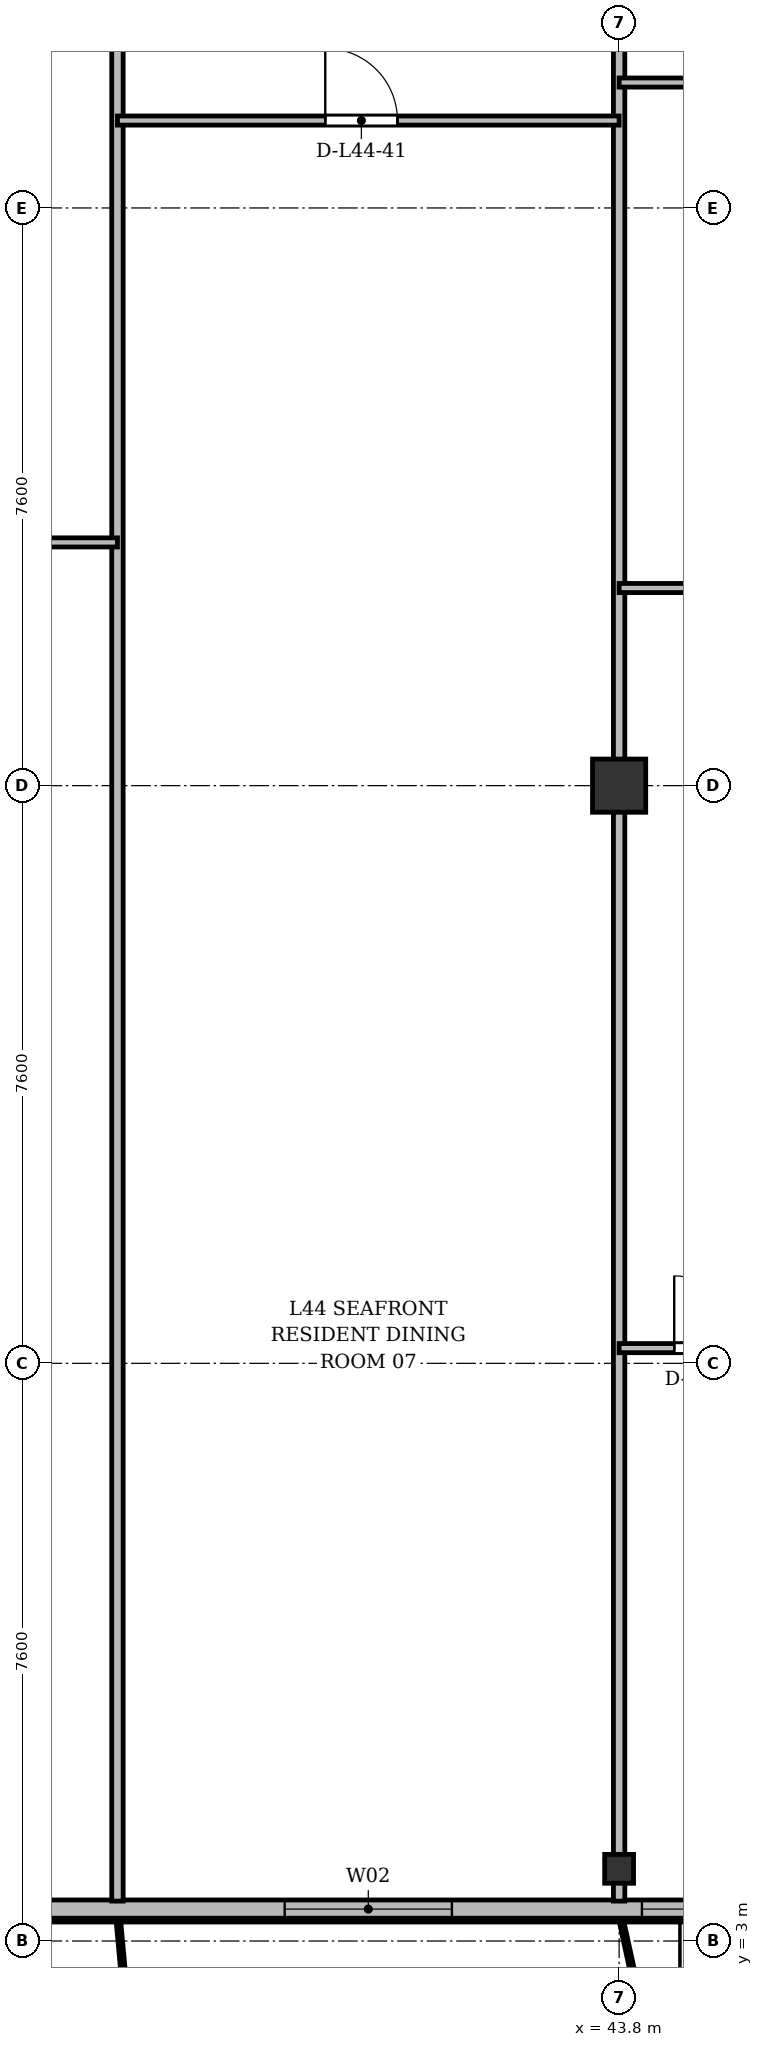
"""IFC4 building model, lengths in metres.
Left out: names, types, materials, properties, quantities, classifications, styles, units other than length and angle.
Written with IfcOpenShell. Run it as: python <this file> out.ifc"""

import sys

from ifc_helpers import new_model, si_unit, direction, frame, frame_2d, origin, origin_2d, place, context, subcontext, project, spatial, rectangle, i_section, extrude, source, transform, mapped, element, fill, save


model = new_model("IFC4")
c1 = context("Model", 3, precision=1e-05, world=origin(), true_north=direction((0.0, 1.0)))
c2 = subcontext(c1, "Body", "Model", "MODEL_VIEW")
j1 = project(units=[si_unit("LENGTHUNIT", "METRE"), si_unit("PLANEANGLEUNIT", "RADIAN")], contexts=[c1])
p1 = place(None, origin())
s1 = spatial("IfcSite", under=j1, at=p1, CompositionType="ELEMENT")
p2 = place(p1, origin())
s2 = spatial("IfcBuilding", under=s1, at=p2, CompositionType="ELEMENT")
p3 = place(p2, frame((0.0, 0.0, 168.1)))
s3 = spatial("IfcBuildingStorey", under=s2, at=p3, CompositionType="ELEMENT", Elevation=168.1)
m1 = source(origin(), c2, "Body", "SweptSolid", [
    extrude(i_section(OverallWidth=0.38, OverallDepth=0.38, WebThickness=0.02, FlangeThickness=0.03, at=origin_2d()), origin(), (0.0, 0.0, 1.0), 3.6),
])
p4 = place(p3, frame((43.8, 3.95, 0.0), z_axis=(0.0, 0.0, 1.0), x_axis=(1.0, 0.0, 0.0)))
e1 = element("IfcColumn", 1, at=p4, inside=s3, PredefinedType="COLUMN", context=c2, shape_type="MappedRepresentation", body=[
    mapped(m1, transform((0.0, 0.0, 0.0), x_axis=(1.0, 0.0, 0.0), y_axis=(0.0, 1.0, 0.0), z_axis=(0.0, 0.0, 1.0), scale=1.0)),
])
m2 = source(origin(), c2, "Body", "SweptSolid", [
    extrude(rectangle(XDim=0.7, YDim=0.7, at=origin_2d()), origin(), (0.0, 0.0, 1.0), 3.6),
])
p5 = place(p3, frame((43.8, 18.2, 0.0), z_axis=(0.0, 0.0, 1.0), x_axis=(1.0, 0.0, 0.0)))
e2 = element("IfcColumn", 2, at=p5, inside=s3, PredefinedType="COLUMN", context=c2, shape_type="MappedRepresentation", body=[
    mapped(m2, transform((0.0, 0.0, 0.0), x_axis=(1.0, 0.0, 0.0), y_axis=(0.0, 1.0, 0.0), z_axis=(0.0, 0.0, 1.0), scale=1.0)),
])
p6 = place(p3, frame((63.6, 3.42, 0.0), z_axis=(0.0, 0.0, 1.0), x_axis=(-1.0, 0.0, 0.0)))
e3 = element("IfcWall", 3, at=p6, inside=s3, PredefinedType="SOLIDWALL", context=c2, shape_type="SweptSolid", body=[
    extrude(rectangle(XDim=52.8, YDim=0.24, at=frame_2d((26.4, 0.0))), origin(), (0.0, 0.0, 1.0), 3.35),
])
p7 = place(p6, frame((1.62, 0.0, 0.9)))
e4 = element("IfcOpeningElement", 4, at=p7, cuts=e3, PredefinedType="OPENING", context=c2, shape_type="SweptSolid", body=[
    extrude(rectangle(XDim=1.65, YDim=1.85, at=frame_2d((0.825, 0.925))), frame((0.0, 0.13, 0.0), z_axis=(0.0, -1.0, 0.0), x_axis=(1.0, 0.0, 0.0)), (0.0, 0.0, 1.0), 0.26),
])
p8 = place(p6, frame((5.2, 0.0, 0.9)))
e5 = element("IfcOpeningElement", 5, at=p8, cuts=e3, PredefinedType="OPENING", context=c2, shape_type="SweptSolid", body=[
    extrude(rectangle(XDim=1.8, YDim=1.8, at=frame_2d((0.9, 0.9))), frame((0.0, 0.13, 0.0), z_axis=(0.0, -1.0, 0.0), x_axis=(1.0, 0.0, 0.0)), (0.0, 0.0, 1.0), 0.26),
])
p9 = place(p6, frame((7.65, 0.0, 0.9)))
e6 = element("IfcOpeningElement", 6, at=p9, cuts=e3, PredefinedType="OPENING", context=c2, shape_type="SweptSolid", body=[
    extrude(rectangle(XDim=1.5, YDim=1.75, at=frame_2d((0.75, 0.875))), frame((0.0, 0.13, 0.0), z_axis=(0.0, -1.0, 0.0), x_axis=(1.0, 0.0, 0.0)), (0.0, 0.0, 1.0), 0.26),
])
p10 = place(p6, frame((10.25, 0.0, 0.9)))
e7 = element("IfcOpeningElement", 7, at=p10, cuts=e3, PredefinedType="OPENING", context=c2, shape_type="SweptSolid", body=[
    extrude(rectangle(XDim=1.5, YDim=1.75, at=frame_2d((0.75, 0.875))), frame((0.0, 0.13, 0.0), z_axis=(0.0, -1.0, 0.0), x_axis=(1.0, 0.0, 0.0)), (0.0, 0.0, 1.0), 0.26),
])
p11 = place(p6, frame((13.62, 0.0, 0.0)))
e8 = element("IfcOpeningElement", 8, at=p11, cuts=e3, PredefinedType="OPENING", context=c2, shape_type="SweptSolid", body=[
    extrude(rectangle(XDim=1.2, YDim=2.2, at=frame_2d((0.6, 1.1))), frame((0.0, 0.13, 0.0), z_axis=(0.0, -1.0, 0.0), x_axis=(1.0, 0.0, 0.0)), (0.0, 0.0, 1.0), 0.26),
])
p12 = place(p6, frame((15.375, 0.0, 0.9)))
e9 = element("IfcOpeningElement", 9, at=p12, cuts=e3, PredefinedType="OPENING", context=c2, shape_type="SweptSolid", body=[
    extrude(rectangle(XDim=1.65, YDim=1.85, at=frame_2d((0.825, 0.925))), frame((0.0, 0.13, 0.0), z_axis=(0.0, -1.0, 0.0), x_axis=(1.0, 0.0, 0.0)), (0.0, 0.0, 1.0), 0.26),
])
p13 = place(p6, frame((17.7, 0.0, 0.9)))
e10 = element("IfcOpeningElement", 10, at=p13, cuts=e3, PredefinedType="OPENING", context=c2, shape_type="SweptSolid", body=[
    extrude(rectangle(XDim=1.8, YDim=1.8, at=frame_2d((0.9, 0.9))), frame((0.0, 0.13, 0.0), z_axis=(0.0, -1.0, 0.0), x_axis=(1.0, 0.0, 0.0)), (0.0, 0.0, 1.0), 0.26),
])
p14 = place(p6, frame((22.0, 0.0, 0.9)))
e11 = element("IfcOpeningElement", 11, at=p14, cuts=e3, PredefinedType="OPENING", context=c2, shape_type="SweptSolid", body=[
    extrude(rectangle(XDim=2.2, YDim=1.8, at=frame_2d((1.1, 0.9))), frame((0.0, 0.13, 0.0), z_axis=(0.0, -1.0, 0.0), x_axis=(1.0, 0.0, 0.0)), (0.0, 0.0, 1.0), 0.26),
])
p15 = place(p6, frame((28.95, 0.0, 0.9)))
e12 = element("IfcOpeningElement", 12, at=p15, cuts=e3, PredefinedType="OPENING", context=c2, shape_type="SweptSolid", body=[
    extrude(rectangle(XDim=1.5, YDim=1.75, at=frame_2d((0.75, 0.875))), frame((0.0, 0.13, 0.0), z_axis=(0.0, -1.0, 0.0), x_axis=(1.0, 0.0, 0.0)), (0.0, 0.0, 1.0), 0.26),
])
p16 = place(p6, frame((35.6, 0.0, 0.9)))
e13 = element("IfcOpeningElement", 13, at=p16, cuts=e3, PredefinedType="OPENING", context=c2, shape_type="SweptSolid", body=[
    extrude(rectangle(XDim=2.0, YDim=1.95, at=frame_2d((1.0, 0.975))), frame((0.0, 0.13, 0.0), z_axis=(0.0, -1.0, 0.0), x_axis=(1.0, 0.0, 0.0)), (0.0, 0.0, 1.0), 0.26),
])
p17 = place(p6, frame((41.656, 0.0, 0.0)))
e14 = element("IfcOpeningElement", 14, at=p17, cuts=e3, PredefinedType="OPENING", context=c2, shape_type="SweptSolid", body=[
    extrude(rectangle(XDim=1.2, YDim=2.2, at=frame_2d((0.6, 1.1))), frame((0.0, 0.13, 0.0), z_axis=(0.0, -1.0, 0.0), x_axis=(1.0, 0.0, 0.0)), (0.0, 0.0, 1.0), 0.26),
])
p18 = place(p6, frame((43.65, 0.0, 0.9)))
e15 = element("IfcOpeningElement", 15, at=p18, cuts=e3, PredefinedType="OPENING", context=c2, shape_type="SweptSolid", body=[
    extrude(rectangle(XDim=1.5, YDim=1.75, at=frame_2d((0.75, 0.875))), frame((0.0, 0.13, 0.0), z_axis=(0.0, -1.0, 0.0), x_axis=(1.0, 0.0, 0.0)), (0.0, 0.0, 1.0), 0.26),
])
p19 = place(p6, frame((45.95, 0.0, 0.9)))
e16 = element("IfcOpeningElement", 16, at=p19, cuts=e3, PredefinedType="OPENING", context=c2, shape_type="SweptSolid", body=[
    extrude(rectangle(XDim=1.5, YDim=1.75, at=frame_2d((0.75, 0.875))), frame((0.0, 0.13, 0.0), z_axis=(0.0, -1.0, 0.0), x_axis=(1.0, 0.0, 0.0)), (0.0, 0.0, 1.0), 0.26),
])
p20 = place(p6, frame((49.605, 0.0, 0.9)))
e17 = element("IfcOpeningElement", 17, at=p20, cuts=e3, PredefinedType="OPENING", context=c2, shape_type="SweptSolid", body=[
    extrude(rectangle(XDim=1.5, YDim=1.75, at=frame_2d((0.75, 0.875))), frame((0.0, 0.13, 0.0), z_axis=(0.0, -1.0, 0.0), x_axis=(1.0, 0.0, 0.0)), (0.0, 0.0, 1.0), 0.26),
])
p21 = place(p3, frame((37.2, 3.525, 0.0), z_axis=(0.0, 0.0, 1.0), x_axis=(0.0, 1.0, 0.0)))
e18 = element("IfcWall", 18, at=p21, inside=s3, PredefinedType="PARTITIONING", context=c2, shape_type="SweptSolid", body=[
    extrude(rectangle(XDim=27.275, YDim=0.15, at=frame_2d((13.638, 0.0))), origin(), (0.0, 0.0, 1.0), 2.75),
])
p22 = place(p3, frame((43.8, 3.525, 0.0), z_axis=(0.0, 0.0, 1.0), x_axis=(0.0, 1.0, 0.0)))
e19 = element("IfcWall", 19, at=p22, inside=s3, PredefinedType="PARTITIONING", context=c2, shape_type="SweptSolid", body=[
    extrude(rectangle(XDim=27.275, YDim=0.15, at=frame_2d((13.638, 0.0))), origin(), (0.0, 0.0, 1.0), 2.85),
])
p23 = place(p3, frame((30.6, 21.4, 0.0), z_axis=(0.0, 0.0, 1.0), x_axis=(1.0, 0.0, 0.0)))
e20 = element("IfcWall", 20, at=p23, inside=s3, PredefinedType="PARTITIONING", context=c2, shape_type="SweptSolid", body=[
    extrude(rectangle(XDim=6.6, YDim=0.12, at=frame_2d((3.3, 0.0))), origin(), (0.0, 0.0, 1.0), 2.85),
])
p24 = place(p23, frame((2.734, 0.0, 0.0)))
e21 = element("IfcOpeningElement", 21, at=p24, cuts=e20, PredefinedType="OPENING", context=c2, shape_type="SweptSolid", body=[
    extrude(rectangle(XDim=0.95, YDim=2.15, at=frame_2d((0.475, 1.075))), frame((0.0, 0.07, 0.0), z_axis=(0.0, -1.0, 0.0), x_axis=(1.0, 0.0, 0.0)), (0.0, 0.0, 1.0), 0.14),
])
p25 = place(p3, frame((37.2, 26.95, 0.0), z_axis=(0.0, 0.0, 1.0), x_axis=(1.0, 0.0, 0.0)))
e22 = element("IfcWall", 22, at=p25, inside=s3, PredefinedType="PARTITIONING", context=c2, shape_type="SweptSolid", body=[
    extrude(rectangle(XDim=6.6, YDim=0.12, at=frame_2d((3.3, 0.0))), origin(), (0.0, 0.0, 1.0), 2.85),
])
p26 = place(p25, frame((2.734, 0.0, 0.0)))
e23 = element("IfcOpeningElement", 23, at=p26, cuts=e22, PredefinedType="OPENING", context=c2, shape_type="SweptSolid", body=[
    extrude(rectangle(XDim=0.95, YDim=2.15, at=frame_2d((0.475, 1.075))), frame((0.0, 0.07, 0.0), z_axis=(0.0, -1.0, 0.0), x_axis=(1.0, 0.0, 0.0)), (0.0, 0.0, 1.0), 0.14),
])
p27 = place(p3, frame((43.8, 20.8, 0.0), z_axis=(0.0, 0.0, 1.0), x_axis=(1.0, 0.0, 0.0)))
e24 = element("IfcWall", 24, at=p27, inside=s3, PredefinedType="PARTITIONING", context=c2, shape_type="SweptSolid", body=[
    extrude(rectangle(XDim=7.2, YDim=0.12, at=frame_2d((3.6, 0.0))), origin(), (0.0, 0.0, 1.0), 2.85),
])
p28 = place(p27, frame((3.125, 0.0, 0.0)))
e25 = element("IfcOpeningElement", 25, at=p28, cuts=e24, PredefinedType="OPENING", context=c2, shape_type="SweptSolid", body=[
    extrude(rectangle(XDim=0.95, YDim=2.15, at=frame_2d((0.475, 1.075))), frame((0.0, 0.07, 0.0), z_axis=(0.0, -1.0, 0.0), x_axis=(1.0, 0.0, 0.0)), (0.0, 0.0, 1.0), 0.14),
])
p29 = place(p3, frame((43.8, 27.45, 0.0), z_axis=(0.0, 0.0, 1.0), x_axis=(1.0, 0.0, 0.0)))
e26 = element("IfcWall", 26, at=p29, inside=s3, PredefinedType="PARTITIONING", context=c2, shape_type="SweptSolid", body=[
    extrude(rectangle(XDim=2.4, YDim=0.12, at=frame_2d((1.2, 0.0))), origin(), (0.0, 0.0, 1.0), 2.85),
])
p30 = place(p3, frame((43.8, 10.8, 0.0), z_axis=(0.0, 0.0, 1.0), x_axis=(1.0, 0.0, 0.0)))
e27 = element("IfcWall", 27, at=p30, inside=s3, PredefinedType="PARTITIONING", context=c2, shape_type="SweptSolid", body=[
    extrude(rectangle(XDim=2.4, YDim=0.12, at=frame_2d((1.2, 0.0))), origin(), (0.0, 0.0, 1.0), 2.85),
])
p31 = place(p30, frame((0.725, 0.0, 0.0)))
e28 = element("IfcOpeningElement", 28, at=p31, cuts=e27, PredefinedType="OPENING", context=c2, shape_type="SweptSolid", body=[
    extrude(rectangle(XDim=0.95, YDim=2.15, at=frame_2d((0.475, 1.075))), frame((0.0, 0.07, 0.0), z_axis=(0.0, -1.0, 0.0), x_axis=(1.0, 0.0, 0.0)), (0.0, 0.0, 1.0), 0.14),
])
m3 = source(origin(), c2, "Body", "SweptSolid", [
    extrude(rectangle(XDim=1.8, YDim=1.8, at=frame_2d((0.9, 0.9))), frame((0.0, 0.03, 0.0), z_axis=(0.0, -1.0, 0.0), x_axis=(1.0, 0.0, 0.0)), (0.0, 0.0, 1.0), 0.06),
])
p32 = place(p13, origin())
e29 = element("IfcWindow", 29, at=p32, inside=s3, PartitioningType="SINGLE_PANEL", PredefinedType="WINDOW", context=c2, shape_type="MappedRepresentation", body=[
    mapped(m3, transform((0.0, 0.0, 0.0), x_axis=(1.0, 0.0, 0.0), y_axis=(0.0, 1.0, 0.0), z_axis=(0.0, 0.0, 1.0), scale=1.0)),
])
fill(e10, e29)
m4 = source(origin(), c2, "Body", "SweptSolid", [
    extrude(rectangle(XDim=2.2, YDim=1.8, at=frame_2d((1.1, 0.9))), frame((0.0, 0.03, 0.0), z_axis=(0.0, -1.0, 0.0), x_axis=(1.0, 0.0, 0.0)), (0.0, 0.0, 1.0), 0.06),
])
p33 = place(p14, origin())
e30 = element("IfcWindow", 30, at=p33, inside=s3, PartitioningType="SINGLE_PANEL", PredefinedType="WINDOW", context=c2, shape_type="MappedRepresentation", body=[
    mapped(m4, transform((0.0, 0.0, 0.0), x_axis=(1.0, 0.0, 0.0), y_axis=(0.0, 1.0, 0.0), z_axis=(0.0, 0.0, 1.0), scale=1.0)),
])
fill(e11, e30)
m5 = source(origin(), c2, "Body", "SweptSolid", [
    extrude(rectangle(XDim=0.95, YDim=2.15, at=frame_2d((0.475, 1.075))), frame((0.0, 0.025, 0.0), z_axis=(0.0, -1.0, 0.0), x_axis=(1.0, 0.0, 0.0)), (0.0, 0.0, 1.0), 0.05),
])
p34 = place(p26, origin())
e31 = element("IfcDoor", 31, at=p34, inside=s3, OperationType="SINGLE_SWING_LEFT", PredefinedType="DOOR", context=c2, shape_type="MappedRepresentation", body=[
    mapped(m5, transform((0.0, 0.0, 0.0), x_axis=(1.0, 0.0, 0.0), y_axis=(0.0, 1.0, 0.0), z_axis=(0.0, 0.0, 1.0), scale=1.0)),
])
fill(e23, e31)
p35 = place(p31, origin())
e32 = element("IfcDoor", 32, at=p35, inside=s3, OperationType="SINGLE_SWING_LEFT", PredefinedType="DOOR", context=c2, shape_type="MappedRepresentation", body=[
    mapped(m5, transform((0.0, 0.0, 0.0), x_axis=(1.0, 0.0, 0.0), y_axis=(0.0, 1.0, 0.0), z_axis=(0.0, 0.0, 1.0), scale=1.0)),
])
fill(e28, e32)
save(model, sys.argv[1])
